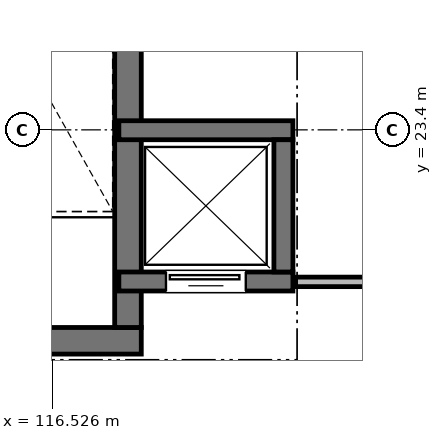
"""IFC4 building model, lengths in metres.
Left out: names, types, materials, properties, quantities, classifications, styles, units other than length and angle.
Written with IfcOpenShell. Run it as: python <this file> out.ifc"""

import sys

from ifc_helpers import new_model, si_unit, direction, frame, frame_2d, origin, place, context, subcontext, project, spatial, rectangle, extrude, element, fill, save


model = new_model("IFC4")
c1 = context("Model", 3, precision=1e-05, world=origin(), true_north=direction((0.0, 1.0)))
c2 = subcontext(c1, "Body", "Model", "MODEL_VIEW")
j1 = project(units=[si_unit("LENGTHUNIT", "METRE"), si_unit("PLANEANGLEUNIT", "RADIAN")], contexts=[c1])
p1 = place(None, origin())
s1 = spatial("IfcSite", under=j1, at=p1, CompositionType="ELEMENT")
p2 = place(p1, origin())
s2 = spatial("IfcBuilding", under=s1, at=p2, CompositionType="ELEMENT")
p3 = place(p2, frame((0.0, 0.0, 19.5)))
s3 = spatial("IfcBuildingStorey", under=s2, at=p3, CompositionType="ELEMENT", Elevation=19.5)
p4 = place(p3, frame((113.85, 20.625, 0.0), z_axis=(0.0, 0.0, 1.0), x_axis=(1.0, 0.0, 0.0)))
e1 = element("IfcWall", 1, at=p4, inside=s3, PredefinedType="SHEAR", context=c2, shape_type="SweptSolid", body=[
    extrude(rectangle(XDim=3.85, YDim=0.35, at=frame_2d((1.925, 0.0))), origin(), (0.0, 0.0, 1.0), 4.28),
])
p5 = place(p4, frame((0.45, 0.0, 0.0)))
e2 = element("IfcOpeningElement", 2, at=p5, cuts=e1, PredefinedType="OPENING", context=c2, shape_type="SweptSolid", body=[
    extrude(rectangle(XDim=1.5, YDim=2.2, at=frame_2d((0.75, 1.1))), frame((0.0, 0.185, 0.0), z_axis=(0.0, -1.0, 0.0), x_axis=(1.0, 0.0, 0.0)), (0.0, 0.0, 1.0), 0.37),
])
p6 = place(p3, frame((117.525, 20.8, 0.0), z_axis=(0.0, 0.0, 1.0), x_axis=(0.0, 1.0, 0.0)))
e3 = element("IfcWall", 3, at=p6, inside=s3, PredefinedType="SHEAR", context=c2, shape_type="SweptSolid", body=[
    extrude(rectangle(XDim=7.05, YDim=0.35, at=frame_2d((3.525, 0.0))), origin(), (0.0, 0.0, 1.0), 4.28),
])
p7 = place(p3, frame((117.405, 21.405, 0.0), z_axis=(0.0, 0.0, 1.0), x_axis=(1.0, 0.0, 0.0)))
e4 = element("IfcWall", 4, at=p7, inside=s3, PredefinedType="SHEAR", context=c2, shape_type="SweptSolid", body=[
    extrude(rectangle(XDim=2.29, YDim=0.25, at=frame_2d((1.145, 0.0))), origin(), (0.0, 0.0, 1.0), 4.26),
])
p8 = place(p7, frame((0.62, 0.0, 0.0)))
e5 = element("IfcOpeningElement", 5, at=p8, cuts=e4, PredefinedType="OPENING", context=c2, shape_type="SweptSolid", body=[
    extrude(rectangle(XDim=1.05, YDim=2.15, at=frame_2d((0.525, 1.075))), frame((0.0, 0.135, 0.0), z_axis=(0.0, -1.0, 0.0), x_axis=(1.0, 0.0, 0.0)), (0.0, 0.0, 1.0), 0.27),
])
p9 = place(p3, frame((117.405, 23.395, 0.0), z_axis=(0.0, 0.0, 1.0), x_axis=(1.0, 0.0, 0.0)))
e6 = element("IfcWall", 6, at=p9, inside=s3, PredefinedType="SHEAR", context=c2, shape_type="SweptSolid", body=[
    extrude(rectangle(XDim=2.29, YDim=0.25, at=frame_2d((1.145, 0.0))), origin(), (0.0, 0.0, 1.0), 4.26),
])
p10 = place(p3, frame((119.57, 21.53, 0.0), z_axis=(0.0, 0.0, 1.0), x_axis=(0.0, 1.0, 0.0)))
e7 = element("IfcWall", 7, at=p10, inside=s3, PredefinedType="SHEAR", context=c2, shape_type="SweptSolid", body=[
    extrude(rectangle(XDim=1.74, YDim=0.25, at=frame_2d((0.87, 0.0))), origin(), (0.0, 0.0, 1.0), 4.26),
])
p11 = place(p3, frame((119.73, 21.4, 0.0), z_axis=(0.0, 0.0, 1.0), x_axis=(1.0, 0.0, 0.0)))
e8 = element("IfcWall", 8, at=p11, inside=s3, PredefinedType="PARTITIONING", context=c2, shape_type="SweptSolid", body=[
    extrude(rectangle(XDim=14.24, YDim=0.125, at=frame_2d((7.12, 0.0))), origin(), (0.0, 0.0, 1.0), 3.595),
])
p12 = place(p11, frame((6.53, 0.0, 0.0)))
e9 = element("IfcOpeningElement", 9, at=p12, cuts=e8, PredefinedType="OPENING", context=c2, shape_type="SweptSolid", body=[
    extrude(rectangle(XDim=1.18, YDim=2.2, at=frame_2d((0.59, 1.1))), frame((0.0, 0.073, 0.0), z_axis=(0.0, -1.0, 0.0), x_axis=(1.0, 0.0, 0.0)), (0.0, 0.0, 1.0), 0.145),
])
p13 = place(p8, frame((1.05, 0.0, 0.0), z_axis=(0.0, 0.0, 1.0), x_axis=(-1.0, 0.0, 0.0)))
e10 = element("IfcDoor", 10, at=p13, inside=s3, OperationType="SLIDING_TO_RIGHT", PredefinedType="DOOR", context=c2, shape_type="SweptSolid", body=[
    extrude(rectangle(XDim=1.05, YDim=2.15, at=frame_2d((0.525, 1.075))), frame((0.0, 0.025, 0.0), z_axis=(0.0, -1.0, 0.0), x_axis=(1.0, 0.0, 0.0)), (0.0, 0.0, 1.0), 0.05),
])
fill(e5, e10)
save(model, sys.argv[1])
